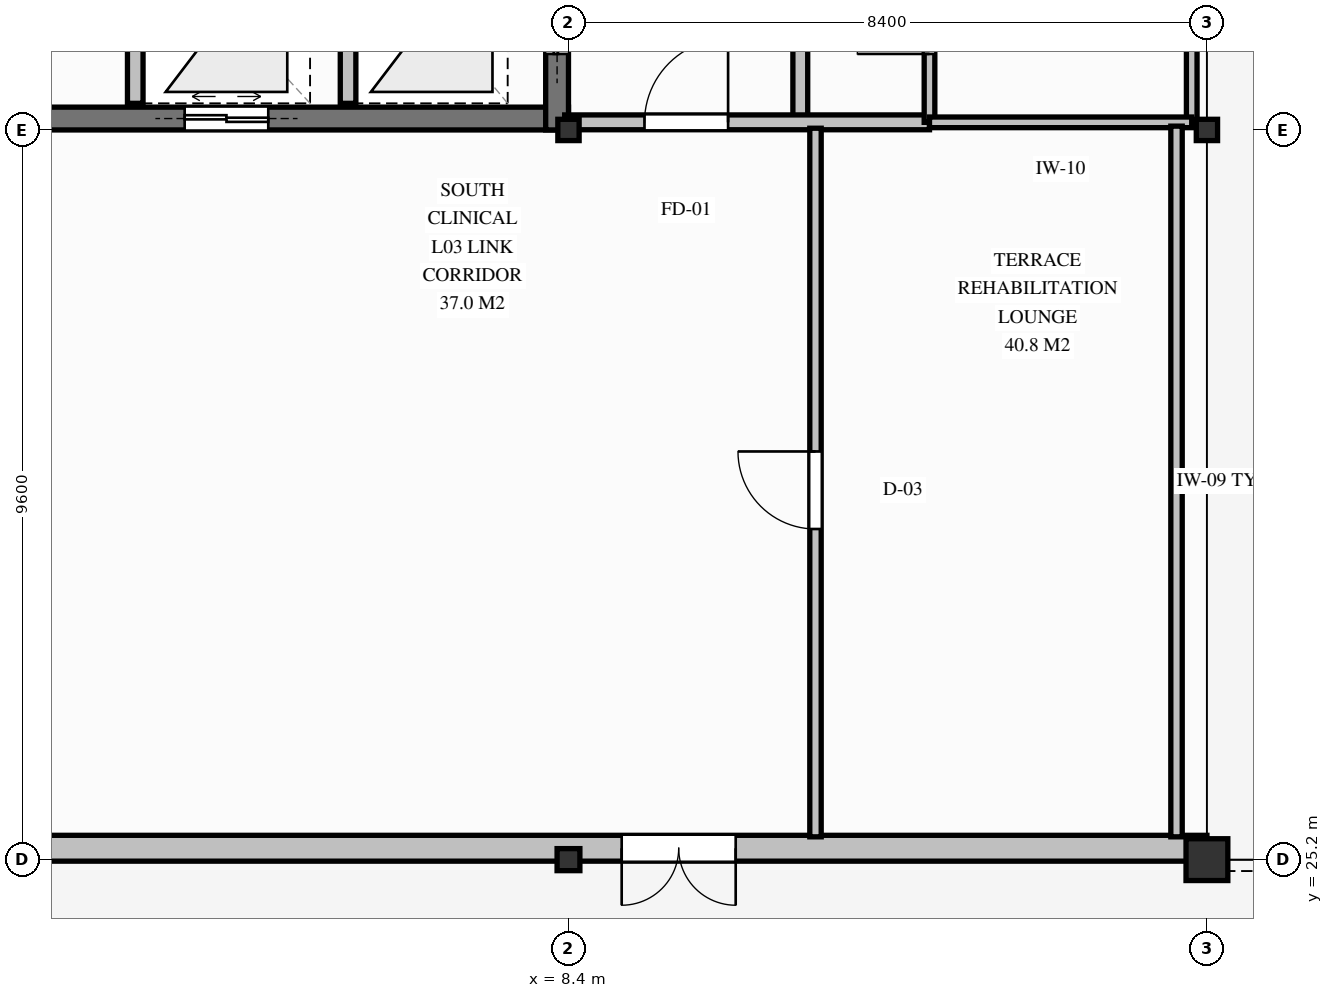
"""IFC4 building model, lengths in metres.
Left out: names, types, materials, properties, quantities, classifications, styles, units other than length and angle.
Written with IfcOpenShell. Run it as: python <this file> out.ifc"""

import sys

from ifc_helpers import new_model, si_unit, direction, frame, frame_2d, origin, origin_2d, place, context, subcontext, project, spatial, rectangle, i_section, extrude, element, fill, save


model = new_model("IFC4")
c1 = context("Model", 3, precision=1e-05, world=origin(), true_north=direction((0.0, 1.0)))
c2 = subcontext(c1, "Body", "Model", "MODEL_VIEW")
j1 = project(units=[si_unit("LENGTHUNIT", "METRE"), si_unit("PLANEANGLEUNIT", "RADIAN")], contexts=[c1])
p1 = place(None, origin())
s1 = spatial("IfcSite", under=j1, at=p1, CompositionType="ELEMENT")
p2 = place(p1, origin())
s2 = spatial("IfcBuilding", under=s1, at=p2, CompositionType="ELEMENT")
p3 = place(p2, frame((0.0, 0.0, 13.2)))
s3 = spatial("IfcBuildingStorey", under=s2, at=p3, CompositionType="ELEMENT", Elevation=13.2)
p4 = place(p3, frame((0.0, 34.95, 0.0), z_axis=(0.0, 0.0, 1.0), x_axis=(1.0, 0.0, 0.0)))
e1 = element("IfcWall", 1, at=p4, inside=s3, PredefinedType="SHEAR", context=c2, shape_type="SweptSolid", body=[
    extrude(rectangle(XDim=8.4, YDim=0.3, at=frame_2d((4.2, 0.0))), origin(), (0.0, 0.0, 1.0), 4.05),
])
p5 = place(p4, frame((3.35, 0.0, 0.0)))
e2 = element("IfcOpeningElement", 2, at=p5, cuts=e1, PredefinedType="OPENING", context=c2, shape_type="SweptSolid", body=[
    extrude(rectangle(XDim=1.1, YDim=2.1, at=frame_2d((0.55, 1.05))), frame((0.0, 0.16, 0.0), z_axis=(0.0, -1.0, 0.0), x_axis=(1.0, 0.0, 0.0)), (0.0, 0.0, 1.0), 0.32),
])
p6 = place(p3, frame((8.25, 34.8, 0.0), z_axis=(0.0, 0.0, 1.0), x_axis=(0.0, 1.0, 0.0)))
e3 = element("IfcWall", 3, at=p6, inside=s3, PredefinedType="SHEAR", context=c2, shape_type="SweptSolid", body=[
    extrude(rectangle(XDim=8.0, YDim=0.3, at=frame_2d((4.0, 0.0))), origin(), (0.0, 0.0, 1.0), 4.05),
])
p7 = place(p6, frame((2.95, 0.0, 0.0)))
e4 = element("IfcOpeningElement", 4, at=p7, cuts=e3, PredefinedType="OPENING", context=c2, shape_type="SweptSolid", body=[
    extrude(rectangle(XDim=1.1, YDim=2.15, at=frame_2d((0.55, 1.075))), frame((0.0, 0.16, 0.0), z_axis=(0.0, -1.0, 0.0), x_axis=(1.0, 0.0, 0.0)), (0.0, 0.0, 1.0), 0.32),
])
p8 = place(p6, frame((1.0, 0.0, 0.0)))
e5 = element("IfcOpeningElement", 5, at=p8, cuts=e3, PredefinedType="OPENING", context=c2, shape_type="SweptSolid", body=[
    extrude(rectangle(XDim=1.1, YDim=2.1, at=frame_2d((0.55, 1.05))), frame((0.0, 0.16, 0.0), z_axis=(0.0, -1.0, 0.0), x_axis=(1.0, 0.0, 0.0)), (0.0, 0.0, 1.0), 0.32),
])
p9 = place(p3, frame((8.4, 25.2, 0.0), z_axis=(0.0, 0.0, 1.0), x_axis=(1.0, 0.0, 0.0)))
e6 = element("IfcColumn", 6, at=p9, inside=s3, PredefinedType="COLUMN", context=c2, shape_type="SweptSolid", body=[
    extrude(i_section(OverallWidth=0.3, OverallDepth=0.29, WebThickness=0.009, FlangeThickness=0.014, FilletRadius=0.027, at=origin_2d()), origin(), (0.0, 0.0, 1.0), 4.05),
])
p10 = place(p3, frame((8.4, 34.8, 0.0), z_axis=(0.0, 0.0, 1.0), x_axis=(1.0, 0.0, 0.0)))
e7 = element("IfcColumn", 7, at=p10, inside=s3, PredefinedType="COLUMN", context=c2, shape_type="SweptSolid", body=[
    extrude(i_section(OverallWidth=0.28, OverallDepth=0.28, WebThickness=0.01, FlangeThickness=0.018, FilletRadius=0.024, at=origin_2d()), origin(), (0.0, 0.0, 1.0), 4.05),
])
p11 = place(p3, frame((16.8, 25.2, 0.0), z_axis=(0.0, 0.0, 1.0), x_axis=(1.0, 0.0, 0.0)))
e8 = element("IfcColumn", 8, at=p11, inside=s3, PredefinedType="COLUMN", context=c2, shape_type="SweptSolid", body=[
    extrude(rectangle(XDim=0.55, YDim=0.55, at=origin_2d()), origin(), (0.0, 0.0, 1.0), 4.05),
])
p12 = place(p3, frame((16.8, 34.8, 0.0), z_axis=(0.0, 0.0, 1.0), x_axis=(1.0, 0.0, 0.0)))
e9 = element("IfcColumn", 9, at=p12, inside=s3, PredefinedType="COLUMN", context=c2, shape_type="SweptSolid", body=[
    extrude(i_section(OverallWidth=0.28, OverallDepth=0.28, WebThickness=0.01, FlangeThickness=0.018, FilletRadius=0.024, at=origin_2d()), origin(), (0.0, 0.0, 1.0), 4.05),
])
p13 = place(p3, frame((16.8, 25.35, 0.0), z_axis=(0.0, 0.0, 1.0), x_axis=(-1.0, 0.0, 0.0)))
e10 = element("IfcWall", 10, at=p13, inside=s3, PredefinedType="SOLIDWALL", context=c2, shape_type="SweptSolid", body=[
    extrude(rectangle(XDim=16.8, YDim=0.34, at=frame_2d((8.4, 0.0))), origin(), (0.0, 0.0, 1.0), 3.338),
])
p14 = place(p13, frame((6.2, 0.0, 0.0)))
e11 = element("IfcOpeningElement", 11, at=p14, cuts=e10, PredefinedType="OPENING", context=c2, shape_type="SweptSolid", body=[
    extrude(rectangle(XDim=1.5, YDim=2.25, at=frame_2d((0.75, 1.125))), frame((0.0, 0.18, 0.0), z_axis=(0.0, -1.0, 0.0), x_axis=(1.0, 0.0, 0.0)), (0.0, 0.0, 1.0), 0.36),
])
for number, where, z_axis, x_axis in (
    (12, (5.5, 35.15, 0.0), (0.0, 0.0, 1.0), (0.0, 1.0, 0.0)),
    (13, (2.7, 35.15, 0.0), (0.0, 0.0, 1.0), (0.0, 1.0, 0.0)),
):
    element("IfcWall", number, at=place(p3, frame(where, z_axis=z_axis, x_axis=x_axis)), inside=s3, PredefinedType="PARTITIONING", context=c2, shape_type="SweptSolid", body=[
        extrude(rectangle(XDim=2.4, YDim=0.205, at=frame_2d((1.2, 0.0))), origin(), (0.0, 0.0, 1.0), 3.78),
    ])
p15 = place(p3, frame((11.45, 34.9, 0.0), z_axis=(0.0, 0.0, 1.0), x_axis=(0.0, 1.0, 0.0)))
e14 = element("IfcWall", 14, at=p15, inside=s3, PredefinedType="PARTITIONING", context=c2, shape_type="SweptSolid", body=[
    extrude(rectangle(XDim=2.65, YDim=0.195, at=frame_2d((1.325, 0.0))), origin(), (0.0, 0.0, 1.0), 3.508),
])
p16 = place(p3, frame((8.35, 34.9, 0.0), z_axis=(0.0, 0.0, 1.0), x_axis=(1.0, 0.0, 0.0)))
e15 = element("IfcWall", 15, at=p16, inside=s3, PredefinedType="PARTITIONING", context=c2, shape_type="SweptSolid", body=[
    extrude(rectangle(XDim=4.8, YDim=0.195, at=frame_2d((2.4, 0.0))), origin(), (0.0, 0.0, 1.0), 3.438),
])
p17 = place(p16, frame((1.05, 0.0, 0.0)))
e16 = element("IfcOpeningElement", 16, at=p17, cuts=e15, PredefinedType="OPENING", context=c2, shape_type="SweptSolid", body=[
    extrude(rectangle(XDim=1.1, YDim=2.15, at=frame_2d((0.55, 1.075))), frame((0.0, 0.107, 0.0), z_axis=(0.0, -1.0, 0.0), x_axis=(1.0, 0.0, 0.0)), (0.0, 0.0, 1.0), 0.215),
])
p18 = place(p3, frame((13.15, 34.9, 0.0), z_axis=(0.0, 0.0, 1.0), x_axis=(0.0, 1.0, 0.0)))
e17 = element("IfcWall", 17, at=p18, inside=s3, PredefinedType="PARTITIONING", context=c2, shape_type="SweptSolid", body=[
    extrude(rectangle(XDim=7.82, YDim=0.14, at=frame_2d((3.91, 0.0))), origin(), (0.0, 0.0, 1.0), 3.478),
])
p19 = place(p18, frame((0.9, 0.0, 0.0)))
e18 = element("IfcOpeningElement", 18, at=p19, cuts=e17, PredefinedType="OPENING", context=c2, shape_type="SweptSolid", body=[
    extrude(rectangle(XDim=0.95, YDim=2.12, at=frame_2d((0.475, 1.06))), frame((0.0, 0.08, 0.0), z_axis=(0.0, -1.0, 0.0), x_axis=(1.0, 0.0, 0.0)), (0.0, 0.0, 1.0), 0.16),
])
p20 = place(p18, frame((3.55, 0.0, 0.0)))
e19 = element("IfcOpeningElement", 19, at=p20, cuts=e17, PredefinedType="OPENING", context=c2, shape_type="SweptSolid", body=[
    extrude(rectangle(XDim=0.98, YDim=2.14, at=frame_2d((0.49, 1.07))), frame((0.0, 0.08, 0.0), z_axis=(0.0, -1.0, 0.0), x_axis=(1.0, 0.0, 0.0)), (0.0, 0.0, 1.0), 0.16),
])
p21 = place(p18, frame((6.08, 0.0, 0.0)))
e20 = element("IfcOpeningElement", 20, at=p21, cuts=e17, PredefinedType="OPENING", context=c2, shape_type="SweptSolid", body=[
    extrude(rectangle(XDim=0.98, YDim=2.14, at=frame_2d((0.49, 1.07))), frame((0.0, 0.08, 0.0), z_axis=(0.0, -1.0, 0.0), x_axis=(1.0, 0.0, 0.0)), (0.0, 0.0, 1.0), 0.16),
])
p22 = place(p3, frame((16.6, 34.9, 0.0), z_axis=(0.0, 0.0, 1.0), x_axis=(0.0, 1.0, 0.0)))
e21 = element("IfcWall", 21, at=p22, inside=s3, PredefinedType="PARTITIONING", context=c2, shape_type="SweptSolid", body=[
    extrude(rectangle(XDim=7.82, YDim=0.14, at=frame_2d((3.91, 0.0))), origin(), (0.0, 0.0, 1.0), 3.228),
])
p23 = place(p3, frame((13.15, 34.9, 0.0), z_axis=(0.0, 0.0, 1.0), x_axis=(1.0, 0.0, 0.0)))
e22 = element("IfcWall", 22, at=p23, inside=s3, PredefinedType="PARTITIONING", context=c2, shape_type="SweptSolid", body=[
    extrude(rectangle(XDim=3.45, YDim=0.14, at=frame_2d((1.725, 0.0))), origin(), (0.0, 0.0, 1.0), 3.488),
])
p24 = place(p3, frame((11.65, 25.5, 0.0), z_axis=(0.0, 0.0, 1.0), x_axis=(0.0, 1.0, 0.0)))
e23 = element("IfcWall", 23, at=p24, inside=s3, PredefinedType="PARTITIONING", context=c2, shape_type="SweptSolid", body=[
    extrude(rectangle(XDim=9.323, YDim=0.15, at=frame_2d((4.661, 0.0))), origin(), (0.0, 0.0, 1.0), 3.508),
])
p25 = place(p24, frame((4.05, 0.0, 0.0)))
e24 = element("IfcOpeningElement", 24, at=p25, cuts=e23, PredefinedType="OPENING", context=c2, shape_type="SweptSolid", body=[
    extrude(rectangle(XDim=1.02, YDim=2.15, at=frame_2d((0.51, 1.075))), frame((0.0, 0.085, 0.0), z_axis=(0.0, -1.0, 0.0), x_axis=(1.0, 0.0, 0.0)), (0.0, 0.0, 1.0), 0.17),
])
p26 = place(p3, frame((16.4, 34.85, 0.0), z_axis=(0.0, 0.0, 1.0), x_axis=(0.0, -1.0, 0.0)))
e25 = element("IfcWall", 25, at=p26, inside=s3, PredefinedType="PARTITIONING", context=c2, shape_type="SweptSolid", body=[
    extrude(rectangle(XDim=9.35, YDim=0.15, at=frame_2d((4.675, 0.0))), origin(), (0.0, 0.0, 1.0), 3.508),
])
p27 = place(p14, origin())
e26 = element("IfcDoor", 26, at=p27, inside=s3, OperationType="DOUBLE_DOOR_SINGLE_SWING", PredefinedType="DOOR", context=c2, shape_type="SweptSolid", body=[
    extrude(rectangle(XDim=1.5, YDim=2.25, at=frame_2d((0.75, 1.125))), frame((0.0, 0.025, 0.0), z_axis=(0.0, -1.0, 0.0), x_axis=(1.0, 0.0, 0.0)), (0.0, 0.0, 1.0), 0.05),
])
fill(e11, e26)
p28 = place(p8, origin())
e27 = element("IfcDoor", 27, at=p28, inside=s3, OperationType="DOUBLE_DOOR_SLIDING", PredefinedType="DOOR", context=c2, shape_type="SweptSolid", body=[
    extrude(rectangle(XDim=1.1, YDim=2.1, at=frame_2d((0.55, 1.05))), frame((0.0, 0.025, 0.0), z_axis=(0.0, -1.0, 0.0), x_axis=(1.0, 0.0, 0.0)), (0.0, 0.0, 1.0), 0.05),
])
fill(e5, e27)
p29 = place(p5, origin())
e28 = element("IfcDoor", 28, at=p29, inside=s3, OperationType="DOUBLE_DOOR_SLIDING", PredefinedType="DOOR", context=c2, shape_type="SweptSolid", body=[
    extrude(rectangle(XDim=1.1, YDim=2.1, at=frame_2d((0.55, 1.05))), frame((0.0, 0.025, 0.0), z_axis=(0.0, -1.0, 0.0), x_axis=(1.0, 0.0, 0.0)), (0.0, 0.0, 1.0), 0.05),
])
fill(e2, e28)
p30 = place(p17, origin())
e29 = element("IfcDoor", 29, at=p30, inside=s3, OperationType="SINGLE_SWING_RIGHT", PredefinedType="DOOR", context=c2, shape_type="SweptSolid", body=[
    extrude(rectangle(XDim=1.1, YDim=2.15, at=frame_2d((0.55, 1.075))), frame((0.0, 0.025, 0.0), z_axis=(0.0, -1.0, 0.0), x_axis=(1.0, 0.0, 0.0)), (0.0, 0.0, 1.0), 0.05),
])
fill(e16, e29)
p31 = place(p19, origin())
e30 = element("IfcDoor", 30, at=p31, inside=s3, OperationType="SINGLE_SWING_LEFT", PredefinedType="DOOR", context=c2, shape_type="SweptSolid", body=[
    extrude(rectangle(XDim=0.95, YDim=2.12, at=frame_2d((0.475, 1.06))), frame((0.0, 0.025, 0.0), z_axis=(0.0, -1.0, 0.0), x_axis=(1.0, 0.0, 0.0)), (0.0, 0.0, 1.0), 0.05),
])
fill(e18, e30)
p32 = place(p25, origin())
e31 = element("IfcDoor", 31, at=p32, inside=s3, OperationType="SINGLE_SWING_RIGHT", PredefinedType="DOOR", context=c2, shape_type="SweptSolid", body=[
    extrude(rectangle(XDim=1.02, YDim=2.15, at=frame_2d((0.51, 1.075))), frame((0.0, 0.025, 0.0), z_axis=(0.0, -1.0, 0.0), x_axis=(1.0, 0.0, 0.0)), (0.0, 0.0, 1.0), 0.05),
])
fill(e24, e31)
save(model, sys.argv[1])
